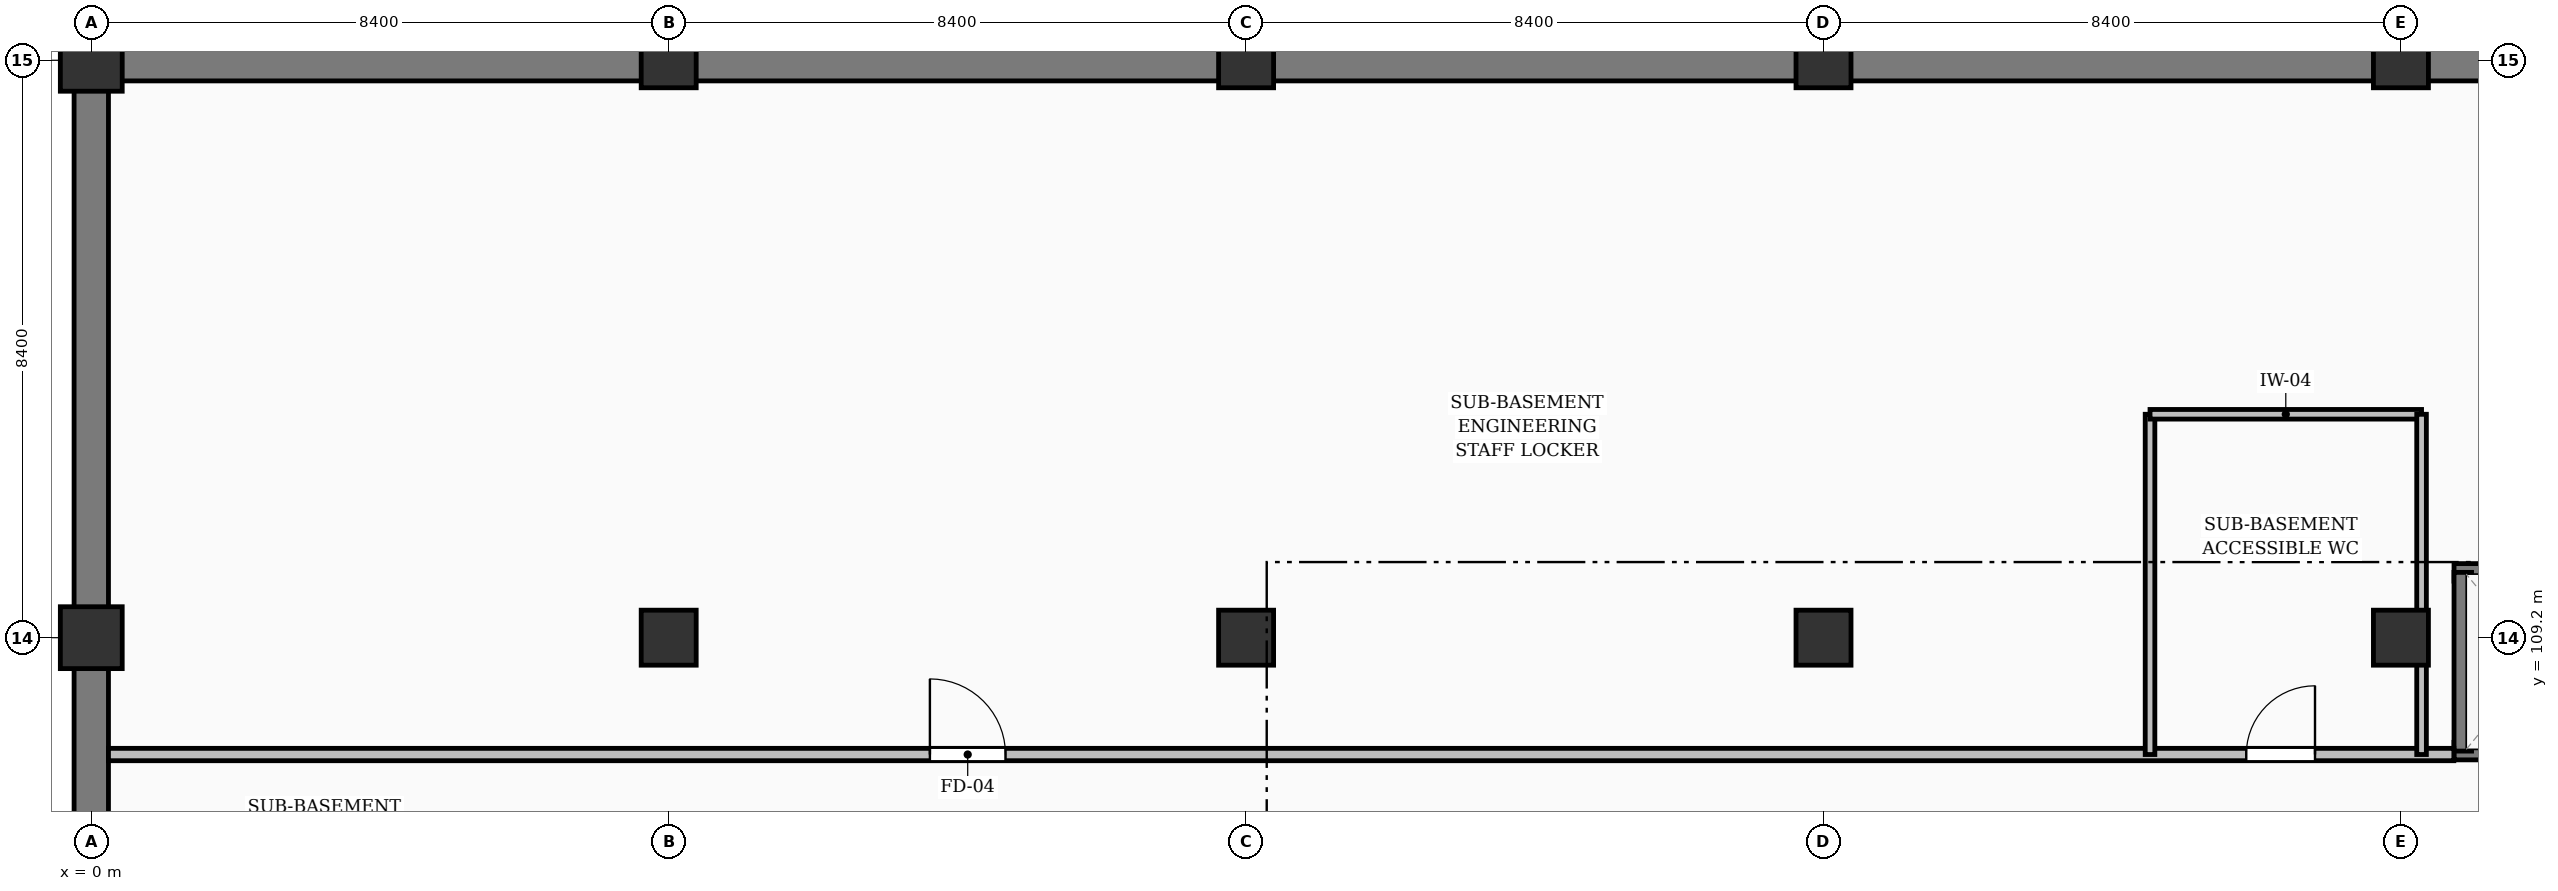
"""IFC4 building model, lengths in metres.
Left out: names, types, materials, properties, quantities, classifications, styles, units other than length and angle.
Written with IfcOpenShell. Run it as: python <this file> out.ifc"""

import sys

from ifc_helpers import new_model, si_unit, direction, frame, frame_2d, origin, origin_2d, place, context, subcontext, project, spatial, rectangle, extrude, element, fill, save


model = new_model("IFC4")
c1 = context("Model", 3, precision=1e-05, world=origin(), true_north=direction((0.0, 1.0)))
c2 = subcontext(c1, "Body", "Model", "MODEL_VIEW")
j1 = project(units=[si_unit("LENGTHUNIT", "METRE"), si_unit("PLANEANGLEUNIT", "RADIAN")], contexts=[c1])
p1 = place(None, origin())
s1 = spatial("IfcSite", under=j1, at=p1, CompositionType="ELEMENT")
p2 = place(p1, origin())
s2 = spatial("IfcBuilding", under=s1, at=p2, CompositionType="ELEMENT")
p3 = place(p2, frame((0.0, 0.0, -7.56)))
s3 = spatial("IfcBuildingStorey", under=s2, at=p3, CompositionType="ELEMENT", Elevation=-7.56)
p4 = place(p3, frame((176.4, 117.6, -0.5), z_axis=(0.0, 0.0, 1.0), x_axis=(-1.0, 0.0, 0.0)))
e1 = element("IfcWall", 1, at=p4, inside=s3, PredefinedType="USERDEFINED", context=c2, shape_type="SweptSolid", body=[
    extrude(rectangle(XDim=176.4, YDim=0.6, at=frame_2d((88.2, 0.0))), origin(), (0.0, 0.0, 1.0), 3.46),
])
p5 = place(p3, frame((0.0, 117.6, -0.5), z_axis=(0.0, 0.0, 1.0), x_axis=(0.0, -1.0, 0.0)))
e2 = element("IfcWall", 2, at=p5, inside=s3, PredefinedType="USERDEFINED", context=c2, shape_type="SweptSolid", body=[
    extrude(rectangle(XDim=33.6, YDim=0.5, at=frame_2d((16.8, 0.0))), origin(), (0.0, 0.0, 1.0), 3.46),
])
for number, where, z_axis, x_axis in (
    (3, (0.0, 109.2, -0.5), (0.0, 0.0, 1.0), (1.0, 0.0, 0.0)),
    (4, (0.0, 117.6, -0.5), (0.0, 0.0, 1.0), (1.0, 0.0, 0.0)),
):
    element("IfcColumn", number, at=place(p3, frame(where, z_axis=z_axis, x_axis=x_axis)), inside=s3, PredefinedType="COLUMN", context=c2, shape_type="SweptSolid", body=[
        extrude(rectangle(XDim=0.9, YDim=0.9, at=origin_2d()), origin(), (0.0, 0.0, 1.0), 3.86),
    ])
for number, where, z_axis, x_axis in (
    (5, (8.4, 109.2, -0.5), (0.0, 0.0, 1.0), (1.0, 0.0, 0.0)),
    (6, (8.4, 117.6, -0.5), (0.0, 0.0, 1.0), (1.0, 0.0, 0.0)),
    (7, (16.8, 109.2, -0.5), (0.0, 0.0, 1.0), (1.0, 0.0, 0.0)),
    (8, (16.8, 117.6, -0.5), (0.0, 0.0, 1.0), (1.0, 0.0, 0.0)),
    (9, (25.2, 109.2, -0.5), (0.0, 0.0, 1.0), (1.0, 0.0, 0.0)),
    (10, (25.2, 117.6, -0.5), (0.0, 0.0, 1.0), (1.0, 0.0, 0.0)),
    (11, (33.6, 109.2, -0.5), (0.0, 0.0, 1.0), (1.0, 0.0, 0.0)),
    (12, (33.6, 117.6, -0.5), (0.0, 0.0, 1.0), (1.0, 0.0, 0.0)),
):
    element("IfcColumn", number, at=place(p3, frame(where, z_axis=z_axis, x_axis=x_axis)), inside=s3, PredefinedType="COLUMN", context=c2, shape_type="SweptSolid", body=[
        extrude(rectangle(XDim=0.8, YDim=0.8, at=origin_2d()), origin(), (0.0, 0.0, 1.0), 3.86),
    ])
p6 = place(p3, frame((34.373, 107.55, -0.5), z_axis=(0.0, 0.0, 1.0), x_axis=(1.0, 0.0, 0.0)))
e13 = element("IfcWall", 13, at=p6, inside=s3, PredefinedType="SOLIDWALL", context=c2, shape_type="SweptSolid", body=[
    extrude(rectangle(XDim=2.455, YDim=0.255, at=frame_2d((1.228, 0.0))), origin(), (0.0, 0.0, 1.0), 3.46),
])
p7 = place(p6, frame((0.677, 0.0, 0.5)))
e14 = element("IfcOpeningElement", 14, at=p7, cuts=e13, PredefinedType="OPENING", context=c2, shape_type="SweptSolid", body=[
    extrude(rectangle(XDim=1.1, YDim=2.15, at=frame_2d((0.55, 1.075))), frame((0.0, 0.137, 0.0), z_axis=(0.0, -1.0, 0.0), x_axis=(1.0, 0.0, 0.0)), (0.0, 0.0, 1.0), 0.275),
])
p8 = place(p3, frame((34.373, 110.15, -0.5), z_axis=(0.0, 0.0, 1.0), x_axis=(1.0, 0.0, 0.0)))
e15 = element("IfcWall", 15, at=p8, inside=s3, PredefinedType="SOLIDWALL", context=c2, shape_type="SweptSolid", body=[
    extrude(rectangle(XDim=2.455, YDim=0.255, at=frame_2d((1.228, 0.0))), origin(), (0.0, 0.0, 1.0), 3.46),
])
p9 = place(p3, frame((34.5, 107.55, -0.5), z_axis=(0.0, 0.0, 1.0), x_axis=(0.0, 1.0, 0.0)))
e16 = element("IfcWall", 16, at=p9, inside=s3, PredefinedType="SOLIDWALL", context=c2, shape_type="SweptSolid", body=[
    extrude(rectangle(XDim=2.6, YDim=0.255, at=frame_2d((1.3, 0.0))), origin(), (0.0, 0.0, 1.0), 3.46),
])
p10 = place(p3, frame((0.25, 107.5, 0.0), z_axis=(0.0, 0.0, 1.0), x_axis=(1.0, 0.0, 0.0)))
e17 = element("IfcWall", 17, at=p10, inside=s3, PredefinedType="PARTITIONING", context=c2, shape_type="SweptSolid", body=[
    extrude(rectangle(XDim=34.12, YDim=0.18, at=frame_2d((17.06, 0.0))), origin(), (0.0, 0.0, 1.0), 2.96),
])
p11 = place(p10, frame((11.95, 0.0, 0.0)))
e18 = element("IfcOpeningElement", 18, at=p11, cuts=e17, PredefinedType="OPENING", context=c2, shape_type="SweptSolid", body=[
    extrude(rectangle(XDim=1.1, YDim=2.1, at=frame_2d((0.55, 1.05))), frame((0.0, 0.1, 0.0), z_axis=(0.0, -1.0, 0.0), x_axis=(1.0, 0.0, 0.0)), (0.0, 0.0, 1.0), 0.2),
])
p12 = place(p10, frame((31.1, 0.0, 0.0)))
e19 = element("IfcOpeningElement", 19, at=p12, cuts=e17, PredefinedType="OPENING", context=c2, shape_type="SweptSolid", body=[
    extrude(rectangle(XDim=1.0, YDim=2.1, at=frame_2d((0.5, 1.05))), frame((0.0, 0.1, 0.0), z_axis=(0.0, -1.0, 0.0), x_axis=(1.0, 0.0, 0.0)), (0.0, 0.0, 1.0), 0.2),
])
p13 = place(p3, frame((29.95, 107.5, 0.0), z_axis=(0.0, 0.0, 1.0), x_axis=(0.0, 1.0, 0.0)))
e20 = element("IfcWall", 20, at=p13, inside=s3, PredefinedType="PARTITIONING", context=c2, shape_type="SweptSolid", body=[
    extrude(rectangle(XDim=4.95, YDim=0.14, at=frame_2d((2.475, 0.0))), origin(), (0.0, 0.0, 1.0), 2.96),
])
p14 = place(p3, frame((29.95, 112.45, 0.0), z_axis=(0.0, 0.0, 1.0), x_axis=(1.0, 0.0, 0.0)))
e21 = element("IfcWall", 21, at=p14, inside=s3, PredefinedType="PARTITIONING", context=c2, shape_type="SweptSolid", body=[
    extrude(rectangle(XDim=3.95, YDim=0.14, at=frame_2d((1.975, 0.0))), origin(), (0.0, 0.0, 1.0), 2.96),
])
p15 = place(p3, frame((33.9, 107.5, 0.0), z_axis=(0.0, 0.0, 1.0), x_axis=(0.0, 1.0, 0.0)))
e22 = element("IfcWall", 22, at=p15, inside=s3, PredefinedType="PARTITIONING", context=c2, shape_type="SweptSolid", body=[
    extrude(rectangle(XDim=4.95, YDim=0.14, at=frame_2d((2.475, 0.0))), origin(), (0.0, 0.0, 1.0), 1.995),
])
p16 = place(p11, origin())
e23 = element("IfcDoor", 23, at=p16, inside=s3, OperationType="SINGLE_SWING_LEFT", PredefinedType="DOOR", context=c2, shape_type="SweptSolid", body=[
    extrude(rectangle(XDim=1.1, YDim=2.1, at=frame_2d((0.55, 1.05))), frame((0.0, 0.025, 0.0), z_axis=(0.0, -1.0, 0.0), x_axis=(1.0, 0.0, 0.0)), (0.0, 0.0, 1.0), 0.05),
])
fill(e18, e23)
p17 = place(p12, origin())
e24 = element("IfcDoor", 24, at=p17, inside=s3, OperationType="SINGLE_SWING_RIGHT", PredefinedType="DOOR", context=c2, shape_type="SweptSolid", body=[
    extrude(rectangle(XDim=1.0, YDim=2.1, at=frame_2d((0.5, 1.05))), frame((0.0, 0.025, 0.0), z_axis=(0.0, -1.0, 0.0), x_axis=(1.0, 0.0, 0.0)), (0.0, 0.0, 1.0), 0.05),
])
fill(e19, e24)
save(model, sys.argv[1])
